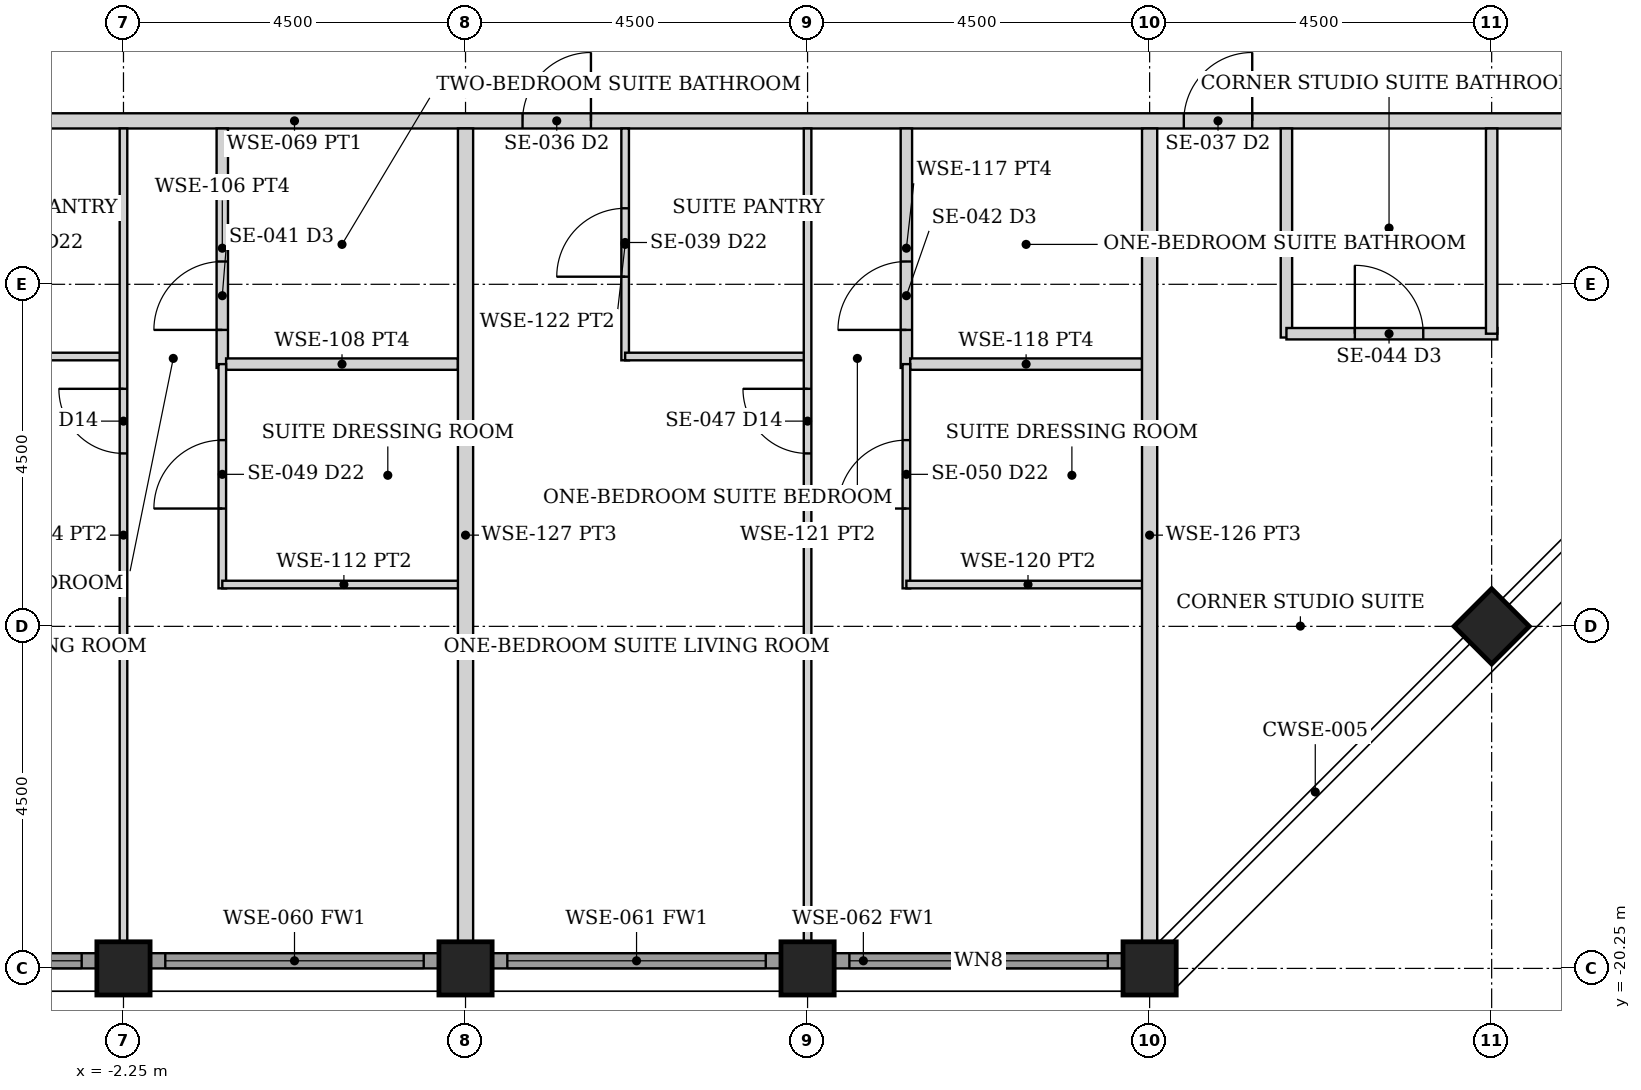
"""IFC4 building model, lengths in metres.
Left out: names, types, materials, properties, quantities, classifications, styles, units other than length and angle.
Written with IfcOpenShell. Run it as: python <this file> out.ifc"""

import sys

from ifc_helpers import new_model, si_unit, direction, frame, frame_2d, origin, origin_2d, place, context, subcontext, project, spatial, rectangle, hollow_rectangle, extrude, element, fill, save


model = new_model("IFC4")
c1 = context("Model", 3, precision=1e-05, world=origin(), true_north=direction((0.0, 1.0)))
c2 = subcontext(c1, "Body", "Model", "MODEL_VIEW")
j1 = project(units=[si_unit("LENGTHUNIT", "METRE"), si_unit("PLANEANGLEUNIT", "RADIAN")], contexts=[c1])
p1 = place(None, origin())
s1 = spatial("IfcSite", under=j1, at=p1, CompositionType="ELEMENT")
p2 = place(p1, origin())
s2 = spatial("IfcBuilding", under=s1, at=p2, CompositionType="ELEMENT")
p3 = place(p2, frame((0.0, 0.0, 253.3)))
s3 = spatial("IfcBuildingStorey", under=s2, at=p3, CompositionType="ELEMENT", Elevation=253.3)
for number, where, z_axis, x_axis in (
    (1, (-2.25, -20.25, 0.0), (0.0, 0.0, 1.0), (0.0, 1.0, 0.0)),
    (2, (2.25, -20.25, 0.0), (0.0, 0.0, 1.0), (0.0, 1.0, 0.0)),
    (3, (6.75, -20.25, 0.0), (0.0, 0.0, 1.0), (0.0, 1.0, 0.0)),
    (4, (11.25, -20.25, 0.0), (0.0, 0.0, 1.0), (0.0, 1.0, 0.0)),
    (5, (15.75, -15.75, 0.0), (0.0, 0.0, 1.0), (0.707, -0.707, 0.0)),
):
    element("IfcColumn", number, at=place(p3, frame(where, z_axis=z_axis, x_axis=x_axis)), inside=s3, PredefinedType="COLUMN", context=c2, shape_type="SweptSolid", body=[
        extrude(hollow_rectangle(XDim=0.7, YDim=0.7, WallThickness=0.035, at=origin_2d()), origin(), (0.0, 0.0, 1.0), 3.75),
    ])
p4 = place(p3, frame((-6.395, -20.15, 0.0), z_axis=(0.0, 0.0, 1.0), x_axis=(1.0, 0.0, 0.0)))
e6 = element("IfcWall", 6, at=p4, inside=s3, PredefinedType="SOLIDWALL", context=c2, shape_type="SweptSolid", body=[
    extrude(rectangle(XDim=3.79, YDim=0.2, at=frame_2d((1.895, 0.0))), origin(), (0.0, 0.0, 1.0), 2.579),
])
p5 = place(p4, frame((0.195, 0.0, 0.3)))
e7 = element("IfcOpeningElement", 7, at=p5, cuts=e6, PredefinedType="OPENING", context=c2, shape_type="SweptSolid", body=[
    extrude(rectangle(XDim=3.4, YDim=2.129, at=frame_2d((1.7, 1.064))), frame((0.0, 0.11, 0.0), z_axis=(0.0, -1.0, 0.0), x_axis=(1.0, 0.0, 0.0)), (0.0, 0.0, 1.0), 0.22),
])
p6 = place(p3, frame((-1.895, -20.15, 0.0), z_axis=(0.0, 0.0, 1.0), x_axis=(1.0, 0.0, 0.0)))
e8 = element("IfcWall", 8, at=p6, inside=s3, PredefinedType="SOLIDWALL", context=c2, shape_type="SweptSolid", body=[
    extrude(rectangle(XDim=3.79, YDim=0.2, at=frame_2d((1.895, 0.0))), origin(), (0.0, 0.0, 1.0), 2.579),
])
p7 = place(p6, frame((0.195, 0.0, 0.3)))
e9 = element("IfcOpeningElement", 9, at=p7, cuts=e8, PredefinedType="OPENING", context=c2, shape_type="SweptSolid", body=[
    extrude(rectangle(XDim=3.4, YDim=2.129, at=frame_2d((1.7, 1.064))), frame((0.0, 0.11, 0.0), z_axis=(0.0, -1.0, 0.0), x_axis=(1.0, 0.0, 0.0)), (0.0, 0.0, 1.0), 0.22),
])
p8 = place(p3, frame((2.605, -20.15, 0.0), z_axis=(0.0, 0.0, 1.0), x_axis=(1.0, 0.0, 0.0)))
e10 = element("IfcWall", 10, at=p8, inside=s3, PredefinedType="SOLIDWALL", context=c2, shape_type="SweptSolid", body=[
    extrude(rectangle(XDim=3.79, YDim=0.2, at=frame_2d((1.895, 0.0))), origin(), (0.0, 0.0, 1.0), 2.579),
])
p9 = place(p8, frame((0.195, 0.0, 0.3)))
e11 = element("IfcOpeningElement", 11, at=p9, cuts=e10, PredefinedType="OPENING", context=c2, shape_type="SweptSolid", body=[
    extrude(rectangle(XDim=3.4, YDim=2.129, at=frame_2d((1.7, 1.064))), frame((0.0, 0.11, 0.0), z_axis=(0.0, -1.0, 0.0), x_axis=(1.0, 0.0, 0.0)), (0.0, 0.0, 1.0), 0.22),
])
p10 = place(p3, frame((7.105, -20.15, 0.0), z_axis=(0.0, 0.0, 1.0), x_axis=(1.0, 0.0, 0.0)))
e12 = element("IfcWall", 12, at=p10, inside=s3, PredefinedType="SOLIDWALL", context=c2, shape_type="SweptSolid", body=[
    extrude(rectangle(XDim=3.79, YDim=0.2, at=frame_2d((1.895, 0.0))), origin(), (0.0, 0.0, 1.0), 2.579),
])
p11 = place(p10, frame((0.195, 0.0, 0.3)))
e13 = element("IfcOpeningElement", 13, at=p11, cuts=e12, PredefinedType="OPENING", context=c2, shape_type="SweptSolid", body=[
    extrude(rectangle(XDim=3.4, YDim=2.129, at=frame_2d((1.7, 1.064))), frame((0.0, 0.11, 0.0), z_axis=(0.0, -1.0, 0.0), x_axis=(1.0, 0.0, 0.0)), (0.0, 0.0, 1.0), 0.22),
])
p12 = place(p3, frame((-20.05, -9.1, 0.0), z_axis=(0.0, 0.0, 1.0), x_axis=(1.0, 0.0, 0.0)))
e14 = element("IfcWall", 14, at=p12, inside=s3, PredefinedType="PARTITIONING", context=c2, shape_type="SweptSolid", body=[
    extrude(rectangle(XDim=40.1, YDim=0.2, at=frame_2d((20.05, 0.0))), origin(), (0.0, 0.0, 1.0), 2.573),
])
p13 = place(p12, frame((14.05, 0.0, 0.0)))
e15 = element("IfcOpeningElement", 15, at=p13, cuts=e14, PredefinedType="OPENING", context=c2, shape_type="SweptSolid", body=[
    extrude(rectangle(XDim=0.9, YDim=2.1, at=frame_2d((0.45, 1.05))), frame((0.0, 0.11, 0.0), z_axis=(0.0, -1.0, 0.0), x_axis=(1.0, 0.0, 0.0)), (0.0, 0.0, 1.0), 0.22),
])
p14 = place(p12, frame((23.05, 0.0, 0.0)))
e16 = element("IfcOpeningElement", 16, at=p14, cuts=e14, PredefinedType="OPENING", context=c2, shape_type="SweptSolid", body=[
    extrude(rectangle(XDim=0.9, YDim=2.1, at=frame_2d((0.45, 1.05))), frame((0.0, 0.11, 0.0), z_axis=(0.0, -1.0, 0.0), x_axis=(1.0, 0.0, 0.0)), (0.0, 0.0, 1.0), 0.22),
])
p15 = place(p12, frame((31.75, 0.0, 0.0)))
e17 = element("IfcOpeningElement", 17, at=p15, cuts=e14, PredefinedType="OPENING", context=c2, shape_type="SweptSolid", body=[
    extrude(rectangle(XDim=0.9, YDim=2.1, at=frame_2d((0.45, 1.05))), frame((0.0, 0.11, 0.0), z_axis=(0.0, -1.0, 0.0), x_axis=(1.0, 0.0, 0.0)), (0.0, 0.0, 1.0), 0.22),
])
p16 = place(p12, frame((7.45, 0.0, 0.0)))
e18 = element("IfcOpeningElement", 18, at=p16, cuts=e14, PredefinedType="OPENING", context=c2, shape_type="SweptSolid", body=[
    extrude(rectangle(XDim=0.9, YDim=2.1, at=frame_2d((0.45, 1.05))), frame((0.0, 0.11, 0.0), z_axis=(0.0, -1.0, 0.0), x_axis=(1.0, 0.0, 0.0)), (0.0, 0.0, 1.0), 0.22),
])
p17 = place(p3, frame((-4.65, -12.2, 0.0), z_axis=(0.0, 0.0, 1.0), x_axis=(1.0, 0.0, 0.0)))
e19 = element("IfcWall", 19, at=p17, inside=s3, PredefinedType="PARTITIONING", context=c2, shape_type="SweptSolid", body=[
    extrude(rectangle(XDim=2.4, YDim=0.1, at=frame_2d((1.2, 0.0))), origin(), (0.0, 0.0, 1.0), 2.573),
])
p18 = place(p3, frame((-2.25, -19.9, 0.0), z_axis=(0.0, 0.0, 1.0), x_axis=(0.0, 1.0, 0.0)))
e20 = element("IfcWall", 20, at=p18, inside=s3, PredefinedType="PARTITIONING", context=c2, shape_type="SweptSolid", body=[
    extrude(rectangle(XDim=10.7, YDim=0.1, at=frame_2d((5.35, 0.0))), origin(), (0.0, 0.0, 1.0), 2.573),
])
p19 = place(p18, frame((6.425, 0.0, 0.0)))
e21 = element("IfcOpeningElement", 21, at=p19, cuts=e20, PredefinedType="OPENING", context=c2, shape_type="SweptSolid", body=[
    extrude(rectangle(XDim=0.85, YDim=2.1, at=frame_2d((0.425, 1.05))), frame((0.0, 0.06, 0.0), z_axis=(0.0, -1.0, 0.0), x_axis=(1.0, 0.0, 0.0)), (0.0, 0.0, 1.0), 0.12),
])
p20 = place(p3, frame((-0.95, -12.35, 0.0), z_axis=(0.0, 0.0, 1.0), x_axis=(0.0, 1.0, 0.0)))
e22 = element("IfcWall", 22, at=p20, inside=s3, PredefinedType="PARTITIONING", context=c2, shape_type="SweptSolid", body=[
    extrude(rectangle(XDim=3.15, YDim=0.15, at=frame_2d((1.575, 0.0))), origin(), (0.0, 0.0, 1.0), 2.573),
])
p21 = place(p20, frame((0.5, 0.0, 0.0)))
e23 = element("IfcOpeningElement", 23, at=p21, cuts=e22, PredefinedType="OPENING", context=c2, shape_type="SweptSolid", body=[
    extrude(rectangle(XDim=0.9, YDim=2.1, at=frame_2d((0.45, 1.05))), frame((0.0, 0.085, 0.0), z_axis=(0.0, -1.0, 0.0), x_axis=(1.0, 0.0, 0.0)), (0.0, 0.0, 1.0), 0.17),
])
p22 = place(p3, frame((-0.9, -12.3, 0.0), z_axis=(0.0, 0.0, 1.0), x_axis=(1.0, 0.0, 0.0)))
e24 = element("IfcWall", 24, at=p22, inside=s3, PredefinedType="PARTITIONING", context=c2, shape_type="SweptSolid", body=[
    extrude(rectangle(XDim=3.05, YDim=0.15, at=frame_2d((1.525, 0.0))), origin(), (0.0, 0.0, 1.0), 2.573),
])
p23 = place(p3, frame((-0.95, -15.25, 0.0), z_axis=(0.0, 0.0, 1.0), x_axis=(0.0, 1.0, 0.0)))
e25 = element("IfcWall", 25, at=p23, inside=s3, PredefinedType="PARTITIONING", context=c2, shape_type="SweptSolid", body=[
    extrude(rectangle(XDim=2.95, YDim=0.1, at=frame_2d((1.475, 0.0))), origin(), (0.0, 0.0, 1.0), 2.573),
])
p24 = place(p23, frame((1.05, 0.0, 0.0)))
e26 = element("IfcOpeningElement", 26, at=p24, cuts=e25, PredefinedType="OPENING", context=c2, shape_type="SweptSolid", body=[
    extrude(rectangle(XDim=0.9, YDim=2.1, at=frame_2d((0.45, 1.05))), frame((0.0, 0.06, 0.0), z_axis=(0.0, -1.0, 0.0), x_axis=(1.0, 0.0, 0.0)), (0.0, 0.0, 1.0), 0.12),
])
p25 = place(p3, frame((-0.95, -15.2, 0.0), z_axis=(0.0, 0.0, 1.0), x_axis=(1.0, 0.0, 0.0)))
e27 = element("IfcWall", 27, at=p25, inside=s3, PredefinedType="PARTITIONING", context=c2, shape_type="SweptSolid", body=[
    extrude(rectangle(XDim=3.2, YDim=0.1, at=frame_2d((1.6, 0.0))), origin(), (0.0, 0.0, 1.0), 2.573),
])
p26 = place(p3, frame((4.35, -12.25, 0.0), z_axis=(0.0, 0.0, 1.0), x_axis=(0.0, 1.0, 0.0)))
e28 = element("IfcWall", 28, at=p26, inside=s3, PredefinedType="PARTITIONING", context=c2, shape_type="SweptSolid", body=[
    extrude(rectangle(XDim=3.05, YDim=0.1, at=frame_2d((1.525, 0.0))), origin(), (0.0, 0.0, 1.0), 2.573),
])
p27 = place(p26, frame((1.1, 0.0, 0.0)))
e29 = element("IfcOpeningElement", 29, at=p27, cuts=e28, PredefinedType="OPENING", context=c2, shape_type="SweptSolid", body=[
    extrude(rectangle(XDim=0.9, YDim=2.1, at=frame_2d((0.45, 1.05))), frame((0.0, 0.06, 0.0), z_axis=(0.0, -1.0, 0.0), x_axis=(1.0, 0.0, 0.0)), (0.0, 0.0, 1.0), 0.12),
])
p28 = place(p3, frame((4.35, -12.2, 0.0), z_axis=(0.0, 0.0, 1.0), x_axis=(1.0, 0.0, 0.0)))
e30 = element("IfcWall", 30, at=p28, inside=s3, PredefinedType="PARTITIONING", context=c2, shape_type="SweptSolid", body=[
    extrude(rectangle(XDim=2.4, YDim=0.1, at=frame_2d((1.2, 0.0))), origin(), (0.0, 0.0, 1.0), 2.573),
])
p29 = place(p3, frame((6.75, -19.9, 0.0), z_axis=(0.0, 0.0, 1.0), x_axis=(0.0, 1.0, 0.0)))
e31 = element("IfcWall", 31, at=p29, inside=s3, PredefinedType="PARTITIONING", context=c2, shape_type="SweptSolid", body=[
    extrude(rectangle(XDim=10.7, YDim=0.1, at=frame_2d((5.35, 0.0))), origin(), (0.0, 0.0, 1.0), 2.573),
])
p30 = place(p29, frame((6.425, 0.0, 0.0)))
e32 = element("IfcOpeningElement", 32, at=p30, cuts=e31, PredefinedType="OPENING", context=c2, shape_type="SweptSolid", body=[
    extrude(rectangle(XDim=0.85, YDim=2.1, at=frame_2d((0.425, 1.05))), frame((0.0, 0.06, 0.0), z_axis=(0.0, -1.0, 0.0), x_axis=(1.0, 0.0, 0.0)), (0.0, 0.0, 1.0), 0.12),
])
p31 = place(p3, frame((8.05, -12.35, 0.0), z_axis=(0.0, 0.0, 1.0), x_axis=(0.0, 1.0, 0.0)))
e33 = element("IfcWall", 33, at=p31, inside=s3, PredefinedType="PARTITIONING", context=c2, shape_type="SweptSolid", body=[
    extrude(rectangle(XDim=3.15, YDim=0.15, at=frame_2d((1.575, 0.0))), origin(), (0.0, 0.0, 1.0), 2.573),
])
p32 = place(p31, frame((0.5, 0.0, 0.0)))
e34 = element("IfcOpeningElement", 34, at=p32, cuts=e33, PredefinedType="OPENING", context=c2, shape_type="SweptSolid", body=[
    extrude(rectangle(XDim=0.9, YDim=2.1, at=frame_2d((0.45, 1.05))), frame((0.0, 0.085, 0.0), z_axis=(0.0, -1.0, 0.0), x_axis=(1.0, 0.0, 0.0)), (0.0, 0.0, 1.0), 0.17),
])
p33 = place(p3, frame((8.1, -12.3, 0.0), z_axis=(0.0, 0.0, 1.0), x_axis=(1.0, 0.0, 0.0)))
e35 = element("IfcWall", 35, at=p33, inside=s3, PredefinedType="PARTITIONING", context=c2, shape_type="SweptSolid", body=[
    extrude(rectangle(XDim=3.05, YDim=0.15, at=frame_2d((1.525, 0.0))), origin(), (0.0, 0.0, 1.0), 2.573),
])
p34 = place(p3, frame((8.05, -15.25, 0.0), z_axis=(0.0, 0.0, 1.0), x_axis=(0.0, 1.0, 0.0)))
e36 = element("IfcWall", 36, at=p34, inside=s3, PredefinedType="PARTITIONING", context=c2, shape_type="SweptSolid", body=[
    extrude(rectangle(XDim=2.95, YDim=0.1, at=frame_2d((1.475, 0.0))), origin(), (0.0, 0.0, 1.0), 2.573),
])
p35 = place(p34, frame((1.05, 0.0, 0.0)))
e37 = element("IfcOpeningElement", 37, at=p35, cuts=e36, PredefinedType="OPENING", context=c2, shape_type="SweptSolid", body=[
    extrude(rectangle(XDim=0.9, YDim=2.1, at=frame_2d((0.45, 1.05))), frame((0.0, 0.06, 0.0), z_axis=(0.0, -1.0, 0.0), x_axis=(1.0, 0.0, 0.0)), (0.0, 0.0, 1.0), 0.12),
])
p36 = place(p3, frame((8.05, -15.2, 0.0), z_axis=(0.0, 0.0, 1.0), x_axis=(1.0, 0.0, 0.0)))
e38 = element("IfcWall", 38, at=p36, inside=s3, PredefinedType="PARTITIONING", context=c2, shape_type="SweptSolid", body=[
    extrude(rectangle(XDim=3.2, YDim=0.1, at=frame_2d((1.6, 0.0))), origin(), (0.0, 0.0, 1.0), 2.573),
])
for number, where, z_axis, x_axis in (
    (39, (2.25, -19.9, 0.0), (0.0, 0.0, 1.0), (0.0, 1.0, 0.0)),
    (40, (11.25, -19.9, 0.0), (0.0, 0.0, 1.0), (0.0, 1.0, 0.0)),
):
    element("IfcWall", number, at=place(p3, frame(where, z_axis=z_axis, x_axis=x_axis)), inside=s3, PredefinedType="PARTITIONING", context=c2, shape_type="SweptSolid", body=[
        extrude(rectangle(XDim=10.7, YDim=0.2, at=frame_2d((5.35, 0.0))), origin(), (0.0, 0.0, 1.0), 2.573),
    ])
p37 = place(p3, frame((13.05, -11.95, 0.0), z_axis=(0.0, 0.0, 1.0), x_axis=(0.0, 1.0, 0.0)))
e41 = element("IfcWall", 41, at=p37, inside=s3, PredefinedType="PARTITIONING", context=c2, shape_type="SweptSolid", body=[
    extrude(rectangle(XDim=2.75, YDim=0.15, at=frame_2d((1.375, 0.0))), origin(), (0.0, 0.0, 1.0), 2.573),
])
p38 = place(p3, frame((13.05, -11.9, 0.0), z_axis=(0.0, 0.0, 1.0), x_axis=(1.0, 0.0, 0.0)))
e42 = element("IfcWall", 42, at=p38, inside=s3, PredefinedType="PARTITIONING", context=c2, shape_type="SweptSolid", body=[
    extrude(rectangle(XDim=2.775, YDim=0.15, at=frame_2d((1.387, 0.0))), origin(), (0.0, 0.0, 1.0), 2.573),
])
p39 = place(p38, frame((0.9, 0.0, 0.0)))
e43 = element("IfcOpeningElement", 43, at=p39, cuts=e42, PredefinedType="OPENING", context=c2, shape_type="SweptSolid", body=[
    extrude(rectangle(XDim=0.9, YDim=2.1, at=frame_2d((0.45, 1.05))), frame((0.0, 0.085, 0.0), z_axis=(0.0, -1.0, 0.0), x_axis=(1.0, 0.0, 0.0)), (0.0, 0.0, 1.0), 0.17),
])
p40 = place(p3, frame((15.75, -11.9, 0.0), z_axis=(0.0, 0.0, 1.0), x_axis=(0.0, 1.0, 0.0)))
e44 = element("IfcWall", 44, at=p40, inside=s3, PredefinedType="PARTITIONING", context=c2, shape_type="SweptSolid", body=[
    extrude(rectangle(XDim=2.7, YDim=0.15, at=frame_2d((1.35, 0.0))), origin(), (0.0, 0.0, 1.0), 2.573),
])
p41 = place(p5, origin())
e45 = element("IfcWindow", 45, at=p41, inside=s3, PartitioningType="SINGLE_PANEL", PredefinedType="WINDOW", context=c2, shape_type="SweptSolid", body=[
    extrude(rectangle(XDim=3.4, YDim=2.129, at=frame_2d((1.7, 1.064))), frame((0.0, 0.03, 0.0), z_axis=(0.0, -1.0, 0.0), x_axis=(1.0, 0.0, 0.0)), (0.0, 0.0, 1.0), 0.06),
])
fill(e7, e45)
p42 = place(p7, origin())
e46 = element("IfcWindow", 46, at=p42, inside=s3, PartitioningType="SINGLE_PANEL", PredefinedType="WINDOW", context=c2, shape_type="SweptSolid", body=[
    extrude(rectangle(XDim=3.4, YDim=2.129, at=frame_2d((1.7, 1.064))), frame((0.0, 0.03, 0.0), z_axis=(0.0, -1.0, 0.0), x_axis=(1.0, 0.0, 0.0)), (0.0, 0.0, 1.0), 0.06),
])
fill(e9, e46)
p43 = place(p9, origin())
e47 = element("IfcWindow", 47, at=p43, inside=s3, PartitioningType="SINGLE_PANEL", PredefinedType="WINDOW", context=c2, shape_type="SweptSolid", body=[
    extrude(rectangle(XDim=3.4, YDim=2.129, at=frame_2d((1.7, 1.064))), frame((0.0, 0.03, 0.0), z_axis=(0.0, -1.0, 0.0), x_axis=(1.0, 0.0, 0.0)), (0.0, 0.0, 1.0), 0.06),
])
fill(e11, e47)
p44 = place(p11, origin())
e48 = element("IfcWindow", 48, at=p44, inside=s3, PartitioningType="SINGLE_PANEL", PredefinedType="WINDOW", context=c2, shape_type="SweptSolid", body=[
    extrude(rectangle(XDim=3.4, YDim=2.129, at=frame_2d((1.7, 1.064))), frame((0.0, 0.03, 0.0), z_axis=(0.0, -1.0, 0.0), x_axis=(1.0, 0.0, 0.0)), (0.0, 0.0, 1.0), 0.06),
])
fill(e13, e48)
p45 = place(p24, origin())
e49 = element("IfcDoor", 49, at=p45, inside=s3, OperationType="SINGLE_SWING_LEFT", PredefinedType="DOOR", context=c2, shape_type="SweptSolid", body=[
    extrude(rectangle(XDim=0.9, YDim=2.1, at=frame_2d((0.45, 1.05))), frame((0.0, 0.025, 0.0), z_axis=(0.0, -1.0, 0.0), x_axis=(1.0, 0.0, 0.0)), (0.0, 0.0, 1.0), 0.05),
])
fill(e26, e49)
p46 = place(p19, origin())
e50 = element("IfcDoor", 50, at=p46, inside=s3, OperationType="SINGLE_SWING_RIGHT", PredefinedType="DOOR", context=c2, shape_type="SweptSolid", body=[
    extrude(rectangle(XDim=0.85, YDim=2.1, at=frame_2d((0.425, 1.05))), frame((0.0, 0.025, 0.0), z_axis=(0.0, -1.0, 0.0), x_axis=(1.0, 0.0, 0.0)), (0.0, 0.0, 1.0), 0.05),
])
fill(e21, e50)
p47 = place(p21, origin())
e51 = element("IfcDoor", 51, at=p47, inside=s3, OperationType="SINGLE_SWING_LEFT", PredefinedType="DOOR", context=c2, shape_type="SweptSolid", body=[
    extrude(rectangle(XDim=0.9, YDim=2.1, at=frame_2d((0.45, 1.05))), frame((0.0, 0.025, 0.0), z_axis=(0.0, -1.0, 0.0), x_axis=(1.0, 0.0, 0.0)), (0.0, 0.0, 1.0), 0.05),
])
fill(e23, e51)
p48 = place(p14, origin())
e52 = element("IfcDoor", 52, at=p48, inside=s3, OperationType="SINGLE_SWING_RIGHT", PredefinedType="DOOR", context=c2, shape_type="SweptSolid", body=[
    extrude(rectangle(XDim=0.9, YDim=2.1, at=frame_2d((0.45, 1.05))), frame((0.0, 0.025, 0.0), z_axis=(0.0, -1.0, 0.0), x_axis=(1.0, 0.0, 0.0)), (0.0, 0.0, 1.0), 0.05),
])
fill(e16, e52)
p49 = place(p27, origin())
e53 = element("IfcDoor", 53, at=p49, inside=s3, OperationType="SINGLE_SWING_LEFT", PredefinedType="DOOR", context=c2, shape_type="SweptSolid", body=[
    extrude(rectangle(XDim=0.9, YDim=2.1, at=frame_2d((0.45, 1.05))), frame((0.0, 0.025, 0.0), z_axis=(0.0, -1.0, 0.0), x_axis=(1.0, 0.0, 0.0)), (0.0, 0.0, 1.0), 0.05),
])
fill(e29, e53)
p50 = place(p35, origin())
e54 = element("IfcDoor", 54, at=p50, inside=s3, OperationType="SINGLE_SWING_LEFT", PredefinedType="DOOR", context=c2, shape_type="SweptSolid", body=[
    extrude(rectangle(XDim=0.9, YDim=2.1, at=frame_2d((0.45, 1.05))), frame((0.0, 0.025, 0.0), z_axis=(0.0, -1.0, 0.0), x_axis=(1.0, 0.0, 0.0)), (0.0, 0.0, 1.0), 0.05),
])
fill(e37, e54)
p51 = place(p30, origin())
e55 = element("IfcDoor", 55, at=p51, inside=s3, OperationType="SINGLE_SWING_RIGHT", PredefinedType="DOOR", context=c2, shape_type="SweptSolid", body=[
    extrude(rectangle(XDim=0.85, YDim=2.1, at=frame_2d((0.425, 1.05))), frame((0.0, 0.025, 0.0), z_axis=(0.0, -1.0, 0.0), x_axis=(1.0, 0.0, 0.0)), (0.0, 0.0, 1.0), 0.05),
])
fill(e32, e55)
p52 = place(p32, origin())
e56 = element("IfcDoor", 56, at=p52, inside=s3, OperationType="SINGLE_SWING_LEFT", PredefinedType="DOOR", context=c2, shape_type="SweptSolid", body=[
    extrude(rectangle(XDim=0.9, YDim=2.1, at=frame_2d((0.45, 1.05))), frame((0.0, 0.025, 0.0), z_axis=(0.0, -1.0, 0.0), x_axis=(1.0, 0.0, 0.0)), (0.0, 0.0, 1.0), 0.05),
])
fill(e34, e56)
p53 = place(p15, origin())
e57 = element("IfcDoor", 57, at=p53, inside=s3, OperationType="SINGLE_SWING_RIGHT", PredefinedType="DOOR", context=c2, shape_type="SweptSolid", body=[
    extrude(rectangle(XDim=0.9, YDim=2.1, at=frame_2d((0.45, 1.05))), frame((0.0, 0.025, 0.0), z_axis=(0.0, -1.0, 0.0), x_axis=(1.0, 0.0, 0.0)), (0.0, 0.0, 1.0), 0.05),
])
fill(e17, e57)
p54 = place(p39, origin())
e58 = element("IfcDoor", 58, at=p54, inside=s3, OperationType="SINGLE_SWING_LEFT", PredefinedType="DOOR", context=c2, shape_type="SweptSolid", body=[
    extrude(rectangle(XDim=0.9, YDim=2.1, at=frame_2d((0.45, 1.05))), frame((0.0, 0.025, 0.0), z_axis=(0.0, -1.0, 0.0), x_axis=(1.0, 0.0, 0.0)), (0.0, 0.0, 1.0), 0.05),
])
fill(e43, e58)
save(model, sys.argv[1])
